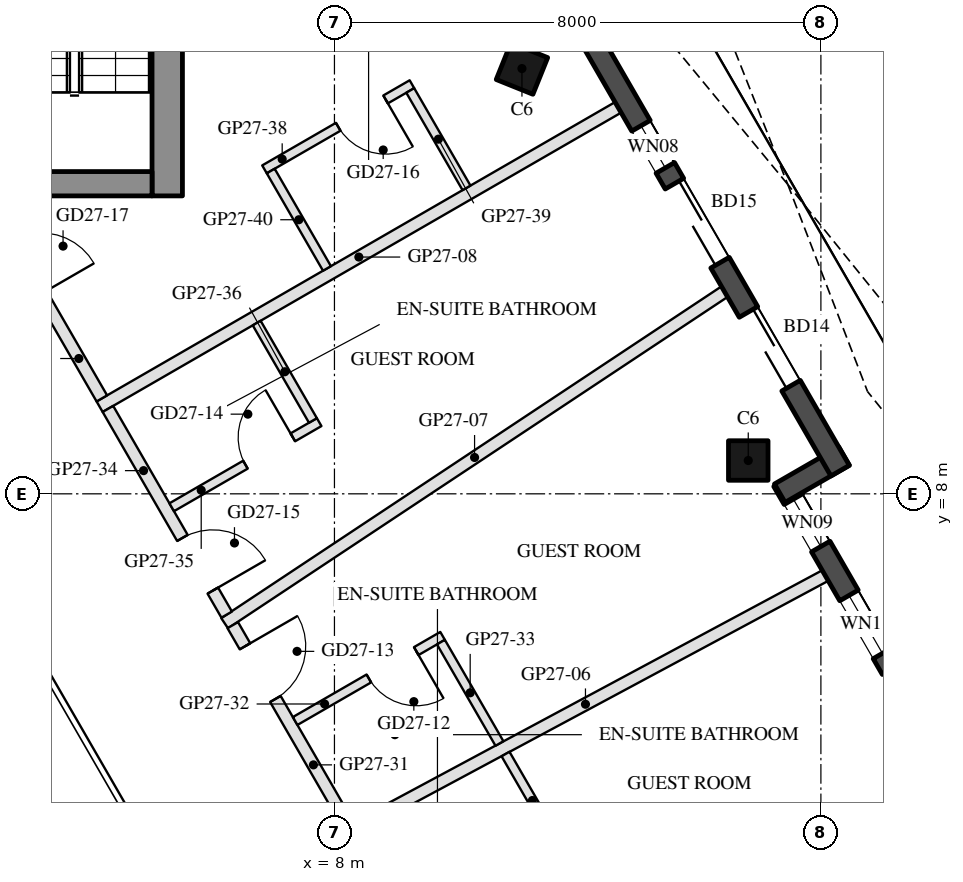
"""IFC4 building model, lengths in metres.
Left out: names, types, materials, properties, quantities, classifications, styles, units other than length and angle.
Written with IfcOpenShell. Run it as: python <this file> out.ifc"""

import sys

from ifc_helpers import new_model, si_unit, direction, frame, frame_2d, origin, origin_2d, place, context, subcontext, project, spatial, rectangle, hollow_rectangle, extrude, boolean, halfspace, element, fill, save


model = new_model("IFC4")
c1 = context("Model", 3, precision=1e-05, world=origin(), true_north=direction((0.0, 1.0)))
c2 = subcontext(c1, "Body", "Model", "MODEL_VIEW")
j1 = project(units=[si_unit("LENGTHUNIT", "METRE"), si_unit("PLANEANGLEUNIT", "RADIAN")], contexts=[c1])
p1 = place(None, origin())
s1 = spatial("IfcSite", under=j1, at=p1, CompositionType="ELEMENT")
p2 = place(p1, origin())
s2 = spatial("IfcBuilding", under=s1, at=p2, CompositionType="ELEMENT")
p3 = place(p2, frame((0.0, 0.0, 276.3)))
s3 = spatial("IfcBuildingStorey", under=s2, at=p3, CompositionType="ELEMENT", Elevation=276.3)
p4 = place(p3, frame((14.805, 8.548, 0.0), z_axis=(-0.131228839908, -0.075723997581, 0.988455799602), x_axis=(0.499841813697, -0.866116713392, 7.933019e-06)))
e1 = element("IfcColumn", 1, at=p4, inside=s3, PredefinedType="COLUMN", context=c2, shape_type="SweptSolid", body=[
    boolean("DIFFERENCE", boolean("DIFFERENCE", extrude(hollow_rectangle(XDim=0.65, YDim=0.65, WallThickness=0.03, at=origin_2d()), origin(), (0.0, 0.0, 1.0), 3.743), halfspace(frame((0.0, 0.0, 0.037), z_axis=(0.0, 0.0, 1.0), x_axis=(1.0, 0.0, 0.0)), True)), halfspace(frame((0.0, 0.0, 3.706), z_axis=(0.0, 0.0, 1.0), x_axis=(1.0, 0.0, 0.0)), False)),
])
p5 = place(p3, frame((11.083, 14.994, 0.0), z_axis=(-0.100518021011, -0.128316722417, 0.98662604172), x_axis=(-0.503129383785, 0.862065632243, 0.060857775822)))
e2 = element("IfcColumn", 2, at=p5, inside=s3, PredefinedType="COLUMN", context=c2, shape_type="SweptSolid", body=[
    boolean("DIFFERENCE", boolean("DIFFERENCE", extrude(hollow_rectangle(XDim=0.65, YDim=0.65, WallThickness=0.03, at=origin_2d()), origin(), (0.0, 0.0, 1.0), 3.75), halfspace(frame((0.0, 0.0, 0.04), z_axis=(0.0, 0.0, 1.0), x_axis=(1.0, 0.0, 0.0)), True)), halfspace(frame((0.0, 0.0, 3.71), z_axis=(0.0, 0.0, 1.0), x_axis=(1.0, 0.0, 0.0)), False)),
])
p6 = place(p3, frame((18.519, 2.766, 0.0), z_axis=(0.0, 0.0, 1.0), x_axis=(-0.499995993298, 0.866027717042, 0.0)))
e3 = element("IfcWall", 3, at=p6, inside=s3, PredefinedType="SOLIDWALL", context=c2, shape_type="SweptSolid", body=[
    extrude(rectangle(XDim=6.284, YDim=0.35, at=frame_2d((3.142, 0.0))), origin(), (0.0, 0.0, 1.0), 3.55),
])
p7 = place(p6, frame((1.213, 0.0, 0.0)))
e4 = element("IfcOpeningElement", 4, at=p7, cuts=e3, PredefinedType="OPENING", context=c2, shape_type="SweptSolid", body=[
    extrude(rectangle(XDim=1.5, YDim=2.4, at=frame_2d((0.75, 1.2))), frame((0.0, 0.185, 0.0), z_axis=(0.0, -1.0, 0.0), x_axis=(1.0, 0.0, 0.0)), (0.0, 0.0, 1.0), 0.37),
])
p8 = place(p6, frame((3.013, 0.0, 0.3)))
e5 = element("IfcOpeningElement", 5, at=p8, cuts=e3, PredefinedType="OPENING", context=c2, shape_type="SweptSolid", body=[
    extrude(rectangle(XDim=1.1, YDim=2.65, at=frame_2d((0.55, 1.325))), frame((0.0, 0.185, 0.0), z_axis=(0.0, -1.0, 0.0), x_axis=(1.0, 0.0, 0.0)), (0.0, 0.0, 1.0), 0.37),
])
p9 = place(p6, frame((5.042, 0.0, 0.3)))
e6 = element("IfcOpeningElement", 6, at=p9, cuts=e3, PredefinedType="OPENING", context=c2, shape_type="SweptSolid", body=[
    extrude(rectangle(XDim=0.9, YDim=2.65, at=frame_2d((0.45, 1.325))), frame((0.0, 0.185, 0.0), z_axis=(0.0, -1.0, 0.0), x_axis=(1.0, 0.0, 0.0)), (0.0, 0.0, 1.0), 0.37),
])
p10 = place(p3, frame((15.324, 8.01, 0.0), z_axis=(0.0, 0.0, 1.0), x_axis=(0.866005645448, 0.500034220881, 0.0)))
e7 = element("IfcWall", 7, at=p10, inside=s3, PredefinedType="SOLIDWALL", context=c2, shape_type="SweptSolid", body=[
    extrude(rectangle(XDim=1.22, YDim=0.35, at=frame_2d((0.61, 0.0))), origin(), (0.0, 0.0, 1.0), 3.55),
])
p11 = place(p3, frame((16.316, 8.381, 0.0), z_axis=(0.0, 0.0, 1.0), x_axis=(-0.500005190411, 0.866022407078, 0.0)))
e8 = element("IfcWall", 8, at=p11, inside=s3, PredefinedType="SOLIDWALL", context=c2, shape_type="SweptSolid", body=[
    extrude(rectangle(XDim=9.244, YDim=0.35, at=frame_2d((4.622, 0.0))), origin(), (0.0, 0.0, 1.0), 3.55),
])
p12 = place(p11, frame((1.614, 0.0, 0.0)))
e9 = element("IfcOpeningElement", 9, at=p12, cuts=e8, PredefinedType="OPENING", context=c2, shape_type="SweptSolid", body=[
    extrude(rectangle(XDim=1.4, YDim=2.4, at=frame_2d((0.7, 1.2))), frame((0.0, 0.185, 0.0), z_axis=(0.0, -1.0, 0.0), x_axis=(1.0, 0.0, 0.0)), (0.0, 0.0, 1.0), 0.37),
])
p13 = place(p11, frame((3.95, 0.0, 0.0)))
e10 = element("IfcOpeningElement", 10, at=p13, cuts=e8, PredefinedType="OPENING", context=c2, shape_type="SweptSolid", body=[
    extrude(rectangle(XDim=1.5, YDim=2.4, at=frame_2d((0.75, 1.2))), frame((0.0, 0.185, 0.0), z_axis=(0.0, -1.0, 0.0), x_axis=(1.0, 0.0, 0.0)), (0.0, 0.0, 1.0), 0.37),
])
p14 = place(p11, frame((5.75, 0.0, 0.3)))
e11 = element("IfcOpeningElement", 11, at=p14, cuts=e8, PredefinedType="OPENING", context=c2, shape_type="SweptSolid", body=[
    extrude(rectangle(XDim=0.8, YDim=2.65, at=frame_2d((0.4, 1.325))), frame((0.0, 0.185, 0.0), z_axis=(0.0, -1.0, 0.0), x_axis=(1.0, 0.0, 0.0)), (0.0, 0.0, 1.0), 0.37),
])
p15 = place(p3, frame((5.25, 12.9, 0.0), z_axis=(0.0, 0.0, 1.0), x_axis=(0.0, 1.0, 0.0)))
e12 = element("IfcWall", 12, at=p15, inside=s3, PredefinedType="SHEAR", context=c2, shape_type="SweptSolid", body=[
    extrude(rectangle(XDim=13.031, YDim=0.5, at=frame_2d((6.516, 0.0))), origin(), (0.0, 0.0, 1.0), 3.5),
])
p16 = place(p3, frame((5.0, 13.1, 0.0), z_axis=(0.0, 0.0, 1.0), x_axis=(-1.0, 0.0, 0.0)))
e13 = element("IfcWall", 13, at=p16, inside=s3, PredefinedType="SHEAR", context=c2, shape_type="SweptSolid", body=[
    extrude(rectangle(XDim=10.0, YDim=0.4, at=frame_2d((5.0, 0.0))), origin(), (0.0, 0.0, 1.0), 3.5),
])
p17 = place(p16, frame((3.55, 0.0, 0.0)))
e14 = element("IfcOpeningElement", 14, at=p17, cuts=e13, PredefinedType="OPENING", context=c2, shape_type="SweptSolid", body=[
    extrude(rectangle(XDim=1.1, YDim=2.1, at=frame_2d((0.55, 1.05))), frame((0.0, 0.21, 0.0), z_axis=(0.0, -1.0, 0.0), x_axis=(1.0, 0.0, 0.0)), (0.0, 0.0, 1.0), 0.42),
])
p18 = place(p16, frame((5.85, 0.0, 0.0)))
e15 = element("IfcOpeningElement", 15, at=p18, cuts=e13, PredefinedType="OPENING", context=c2, shape_type="SweptSolid", body=[
    extrude(rectangle(XDim=1.4, YDim=2.1, at=frame_2d((0.7, 1.05))), frame((0.0, 0.21, 0.0), z_axis=(0.0, -1.0, 0.0), x_axis=(1.0, 0.0, 0.0)), (0.0, 0.0, 1.0), 0.42),
])
p19 = place(p3, frame((17.985, 3.34, 0.0), z_axis=(0.0, 0.0, 1.0), x_axis=(-0.866026066645, -0.499998851889, 0.0)))
e16 = element("IfcWall", 16, at=p19, inside=s3, PredefinedType="PARTITIONING", context=c2, shape_type="SweptSolid", body=[
    extrude(rectangle(XDim=8.946, YDim=0.2, at=frame_2d((4.473, 0.0))), origin(), (0.0, 0.0, 1.0), 3.1),
])
p20 = place(p3, frame((16.071, 6.655, 0.0), z_axis=(0.0, 0.0, 1.0), x_axis=(-0.881152506706, -0.472832168877, 0.0)))
e17 = element("IfcWall", 17, at=p20, inside=s3, PredefinedType="PARTITIONING", context=c2, shape_type="SweptSolid", body=[
    extrude(rectangle(XDim=8.95, YDim=0.2, at=frame_2d((4.475, 0.0))), origin(), (0.0, 0.0, 1.0), 3.1),
])
p21 = place(p3, frame((14.415, 11.325, 0.0), z_axis=(0.0, 0.0, 1.0), x_axis=(-0.833315981996, -0.552796955626, 0.0)))
e18 = element("IfcWall", 18, at=p21, inside=s3, PredefinedType="PARTITIONING", context=c2, shape_type="SweptSolid", body=[
    extrude(rectangle(XDim=9.865, YDim=0.2, at=frame_2d((4.933, 0.0))), origin(), (0.0, 0.0, 1.0), 3.1),
])
p22 = place(p3, frame((12.665, 14.356, 0.0), z_axis=(0.0, 0.0, 1.0), x_axis=(-0.86603115344, -0.499990041172, 0.0)))
e19 = element("IfcWall", 19, at=p22, inside=s3, PredefinedType="PARTITIONING", context=c2, shape_type="SweptSolid", body=[
    extrude(rectangle(XDim=9.846, YDim=0.2, at=frame_2d((4.923, 0.0))), origin(), (0.0, 0.0, 1.0), 3.1),
])
p23 = place(p3, frame((11.696, 2.192, 0.0), z_axis=(0.0, 0.0, 1.0), x_axis=(-0.50006561292, 0.865987518834, 0.0)))
e20 = element("IfcWall", 20, at=p23, inside=s3, PredefinedType="PARTITIONING", context=c2, shape_type="SweptSolid", body=[
    extrude(rectangle(XDim=1.765, YDim=0.15, at=frame_2d((0.883, 0.0))), origin(), (0.0, 0.0, 1.0), 3.05),
])
p24 = place(p3, frame((6.328, 5.84, 0.0), z_axis=(0.0, 0.0, 1.0), x_axis=(0.49997708301, -0.86603863451, 0.0)))
e21 = element("IfcWall", 21, at=p24, inside=s3, PredefinedType="PARTITIONING", context=c2, shape_type="SweptSolid", body=[
    extrude(rectangle(XDim=3.79, YDim=0.2, at=frame_2d((1.895, 0.0))), origin(), (0.0, 0.0, 1.0), 3.05),
])
p25 = place(p24, frame((0.402, 0.0, 0.0)))
e22 = element("IfcOpeningElement", 22, at=p25, cuts=e21, PredefinedType="OPENING", context=c2, shape_type="SweptSolid", body=[
    extrude(rectangle(XDim=1.0, YDim=2.1, at=frame_2d((0.5, 1.05))), frame((0.0, 0.11, 0.0), z_axis=(0.0, -1.0, 0.0), x_axis=(1.0, 0.0, 0.0)), (0.0, 0.0, 1.0), 0.22),
])
p26 = place(p3, frame((9.778, 5.663, 0.0), z_axis=(0.0, 0.0, 1.0), x_axis=(-0.866034573852, -0.49998411664, 0.0)))
e23 = element("IfcWall", 23, at=p26, inside=s3, PredefinedType="PARTITIONING", context=c2, shape_type="SweptSolid", body=[
    extrude(rectangle(XDim=2.8, YDim=0.15, at=frame_2d((1.4, 0.0))), origin(), (0.0, 0.0, 1.0), 3.05),
])
p27 = place(p26, frame((0.5, 0.0, 0.0)))
e24 = element("IfcOpeningElement", 24, at=p27, cuts=e23, PredefinedType="OPENING", context=c2, shape_type="SweptSolid", body=[
    extrude(rectangle(XDim=0.9, YDim=2.1, at=frame_2d((0.45, 1.05))), frame((0.0, 0.085, 0.0), z_axis=(0.0, -1.0, 0.0), x_axis=(1.0, 0.0, 0.0)), (0.0, 0.0, 1.0), 0.17),
])
p28 = place(p3, frame((10.713, 3.894, 0.0), z_axis=(0.0, 0.0, 1.0), x_axis=(-0.499931040243, 0.866065214058, 0.0)))
e25 = element("IfcWall", 25, at=p28, inside=s3, PredefinedType="PARTITIONING", context=c2, shape_type="SweptSolid", body=[
    extrude(rectangle(XDim=1.925, YDim=0.15, at=frame_2d((0.962, 0.0))), origin(), (0.0, 0.0, 1.0), 3.05),
])
p29 = place(p3, frame((4.275, 9.396, 0.0), z_axis=(0.0, 0.0, 1.0), x_axis=(0.499964122822, -0.866046116492, 0.0)))
e26 = element("IfcWall", 26, at=p29, inside=s3, PredefinedType="PARTITIONING", context=c2, shape_type="SweptSolid", body=[
    extrude(rectangle(XDim=3.906, YDim=0.2, at=frame_2d((1.953, 0.0))), origin(), (0.0, 0.0, 1.0), 3.05),
])
p30 = place(p29, frame((2.45, 0.0, 0.0)))
e27 = element("IfcOpeningElement", 27, at=p30, cuts=e26, PredefinedType="OPENING", context=c2, shape_type="SweptSolid", body=[
    extrude(rectangle(XDim=1.0, YDim=2.1, at=frame_2d((0.5, 1.05))), frame((0.0, 0.11, 0.0), z_axis=(0.0, -1.0, 0.0), x_axis=(1.0, 0.0, 0.0)), (0.0, 0.0, 1.0), 0.22),
])
p31 = place(p3, frame((5.324, 7.779, 0.0), z_axis=(0.0, 0.0, 1.0), x_axis=(0.865996816683, 0.500049511043, 0.0)))
e28 = element("IfcWall", 28, at=p31, inside=s3, PredefinedType="PARTITIONING", context=c2, shape_type="SweptSolid", body=[
    extrude(rectangle(XDim=2.8, YDim=0.15, at=frame_2d((1.4, 0.0))), origin(), (0.0, 0.0, 1.0), 3.55),
])
p32 = place(p31, frame((1.4, 0.0, 0.0)))
e29 = element("IfcOpeningElement", 29, at=p32, cuts=e28, PredefinedType="OPENING", context=c2, shape_type="SweptSolid", body=[
    extrude(rectangle(XDim=0.9, YDim=2.1, at=frame_2d((0.45, 1.05))), frame((0.0, 0.085, 0.0), z_axis=(0.0, -1.0, 0.0), x_axis=(1.0, 0.0, 0.0)), (0.0, 0.0, 1.0), 0.17),
])
p33 = place(p3, frame((7.646, 9.207, 0.0), z_axis=(0.0, 0.0, 1.0), x_axis=(-0.49994333299, 0.866058118026, 0.0)))
e30 = element("IfcWall", 30, at=p33, inside=s3, PredefinedType="PARTITIONING", context=c2, shape_type="SweptSolid", body=[
    extrude(rectangle(XDim=1.85, YDim=0.15, at=frame_2d((0.925, 0.0))), origin(), (0.0, 0.0, 1.0), 3.55),
])
p34 = place(p3, frame((2.281, 12.85, 0.0), z_axis=(0.0, 0.0, 1.0), x_axis=(0.499979074716, -0.866037484666, 0.0)))
e31 = element("IfcWall", 31, at=p34, inside=s3, PredefinedType="PARTITIONING", context=c2, shape_type="SweptSolid", body=[
    extrude(rectangle(XDim=3.788, YDim=0.2, at=frame_2d((1.894, 0.0))), origin(), (0.0, 0.0, 1.0), 3.05),
])
p35 = place(p34, frame((0.8, 0.0, 0.0)))
e32 = element("IfcOpeningElement", 32, at=p35, cuts=e31, PredefinedType="OPENING", context=c2, shape_type="SweptSolid", body=[
    extrude(rectangle(XDim=1.0, YDim=2.1, at=frame_2d((0.5, 1.05))), frame((0.0, 0.11, 0.0), z_axis=(0.0, -1.0, 0.0), x_axis=(1.0, 0.0, 0.0)), (0.0, 0.0, 1.0), 0.22),
])
p36 = place(p3, frame((9.274, 14.737, 0.0), z_axis=(0.0, 0.0, 1.0), x_axis=(-0.866018616679, -0.500011755427, 0.0)))
e33 = element("IfcWall", 33, at=p36, inside=s3, PredefinedType="PARTITIONING", context=c2, shape_type="SweptSolid", body=[
    extrude(rectangle(XDim=2.8, YDim=0.15, at=frame_2d((1.4, 0.0))), origin(), (0.0, 0.0, 1.0), 3.55),
])
p37 = place(p36, frame((0.5, 0.0, 0.0)))
e34 = element("IfcOpeningElement", 34, at=p37, cuts=e33, PredefinedType="OPENING", context=c2, shape_type="SweptSolid", body=[
    extrude(rectangle(XDim=0.9, YDim=2.1, at=frame_2d((0.45, 1.05))), frame((0.0, 0.085, 0.0), z_axis=(0.0, -1.0, 0.0), x_axis=(1.0, 0.0, 0.0)), (0.0, 0.0, 1.0), 0.17),
])
p38 = place(p3, frame((10.172, 13.032, 0.0), z_axis=(0.0, 0.0, 1.0), x_axis=(-0.500042316284, 0.866000971088, 0.0)))
e35 = element("IfcWall", 35, at=p38, inside=s3, PredefinedType="PARTITIONING", context=c2, shape_type="SweptSolid", body=[
    extrude(rectangle(XDim=1.85, YDim=0.15, at=frame_2d((0.925, 0.0))), origin(), (0.0, 0.0, 1.0), 3.05),
])
p39 = place(p3, frame((7.877, 11.707, 0.0), z_axis=(0.0, 0.0, 1.0), x_axis=(-0.499985172903, 0.866033964044, 0.0)))
e36 = element("IfcWall", 36, at=p39, inside=s3, PredefinedType="PARTITIONING", context=c2, shape_type="SweptSolid", body=[
    extrude(rectangle(XDim=1.85, YDim=0.15, at=frame_2d((0.925, 0.0))), origin(), (0.0, 0.0, 1.0), 3.05),
])
p40 = place(p8, origin())
e37 = element("IfcWindow", 37, at=p40, inside=s3, PartitioningType="SINGLE_PANEL", PredefinedType="WINDOW", context=c2, shape_type="SweptSolid", body=[
    extrude(rectangle(XDim=1.1, YDim=2.65, at=frame_2d((0.55, 1.325))), frame((0.0, 0.03, 0.0), z_axis=(0.0, -1.0, 0.0), x_axis=(1.0, 0.0, 0.0)), (0.0, 0.0, 1.0), 0.06),
])
fill(e5, e37)
p41 = place(p9, origin())
e38 = element("IfcWindow", 38, at=p41, inside=s3, PartitioningType="SINGLE_PANEL", PredefinedType="WINDOW", context=c2, shape_type="SweptSolid", body=[
    extrude(rectangle(XDim=0.9, YDim=2.65, at=frame_2d((0.45, 1.325))), frame((0.0, 0.03, 0.0), z_axis=(0.0, -1.0, 0.0), x_axis=(1.0, 0.0, 0.0)), (0.0, 0.0, 1.0), 0.06),
])
fill(e6, e38)
p42 = place(p12, frame((1.4, 0.0, 0.0), z_axis=(0.0, 0.0, 1.0), x_axis=(-1.0, 0.0, 0.0)))
e39 = element("IfcDoor", 39, at=p42, inside=s3, OperationType="SLIDING_TO_LEFT", PredefinedType="DOOR", context=c2, shape_type="SweptSolid", body=[
    extrude(rectangle(XDim=1.4, YDim=2.4, at=frame_2d((0.7, 1.2))), frame((0.0, 0.025, 0.0), z_axis=(0.0, -1.0, 0.0), x_axis=(1.0, 0.0, 0.0)), (0.0, 0.0, 1.0), 0.05),
])
fill(e9, e39)
p43 = place(p13, frame((1.5, 0.0, 0.0), z_axis=(0.0, 0.0, 1.0), x_axis=(-1.0, 0.0, 0.0)))
e40 = element("IfcDoor", 40, at=p43, inside=s3, OperationType="SLIDING_TO_LEFT", PredefinedType="DOOR", context=c2, shape_type="SweptSolid", body=[
    extrude(rectangle(XDim=1.5, YDim=2.4, at=frame_2d((0.75, 1.2))), frame((0.0, 0.025, 0.0), z_axis=(0.0, -1.0, 0.0), x_axis=(1.0, 0.0, 0.0)), (0.0, 0.0, 1.0), 0.05),
])
fill(e10, e40)
p44 = place(p14, origin())
e41 = element("IfcWindow", 41, at=p44, inside=s3, PartitioningType="SINGLE_PANEL", PredefinedType="WINDOW", context=c2, shape_type="SweptSolid", body=[
    extrude(rectangle(XDim=0.8, YDim=2.65, at=frame_2d((0.4, 1.325))), frame((0.0, 0.03, 0.0), z_axis=(0.0, -1.0, 0.0), x_axis=(1.0, 0.0, 0.0)), (0.0, 0.0, 1.0), 0.06),
])
fill(e11, e41)
p45 = place(p27, origin())
e42 = element("IfcDoor", 42, at=p45, inside=s3, OperationType="SINGLE_SWING_LEFT", PredefinedType="DOOR", context=c2, shape_type="SweptSolid", body=[
    extrude(rectangle(XDim=0.9, YDim=2.1, at=frame_2d((0.45, 1.05))), frame((0.0, 0.025, 0.0), z_axis=(0.0, -1.0, 0.0), x_axis=(1.0, 0.0, 0.0)), (0.0, 0.0, 1.0), 0.05),
])
fill(e24, e42)
p46 = place(p25, origin())
e43 = element("IfcDoor", 43, at=p46, inside=s3, OperationType="SINGLE_SWING_LEFT", PredefinedType="DOOR", context=c2, shape_type="SweptSolid", body=[
    extrude(rectangle(XDim=1.0, YDim=2.1, at=frame_2d((0.5, 1.05))), frame((0.0, 0.025, 0.0), z_axis=(0.0, -1.0, 0.0), x_axis=(1.0, 0.0, 0.0)), (0.0, 0.0, 1.0), 0.05),
])
fill(e22, e43)
p47 = place(p32, origin())
e44 = element("IfcDoor", 44, at=p47, inside=s3, OperationType="SINGLE_SWING_RIGHT", PredefinedType="DOOR", context=c2, shape_type="SweptSolid", body=[
    extrude(rectangle(XDim=0.9, YDim=2.1, at=frame_2d((0.45, 1.05))), frame((0.0, 0.025, 0.0), z_axis=(0.0, -1.0, 0.0), x_axis=(1.0, 0.0, 0.0)), (0.0, 0.0, 1.0), 0.05),
])
fill(e29, e44)
p48 = place(p30, origin())
e45 = element("IfcDoor", 45, at=p48, inside=s3, OperationType="SINGLE_SWING_RIGHT", PredefinedType="DOOR", context=c2, shape_type="SweptSolid", body=[
    extrude(rectangle(XDim=1.0, YDim=2.1, at=frame_2d((0.5, 1.05))), frame((0.0, 0.025, 0.0), z_axis=(0.0, -1.0, 0.0), x_axis=(1.0, 0.0, 0.0)), (0.0, 0.0, 1.0), 0.05),
])
fill(e27, e45)
p49 = place(p37, origin())
e46 = element("IfcDoor", 46, at=p49, inside=s3, OperationType="SINGLE_SWING_LEFT", PredefinedType="DOOR", context=c2, shape_type="SweptSolid", body=[
    extrude(rectangle(XDim=0.9, YDim=2.1, at=frame_2d((0.45, 1.05))), frame((0.0, 0.025, 0.0), z_axis=(0.0, -1.0, 0.0), x_axis=(1.0, 0.0, 0.0)), (0.0, 0.0, 1.0), 0.05),
])
fill(e34, e46)
save(model, sys.argv[1])
